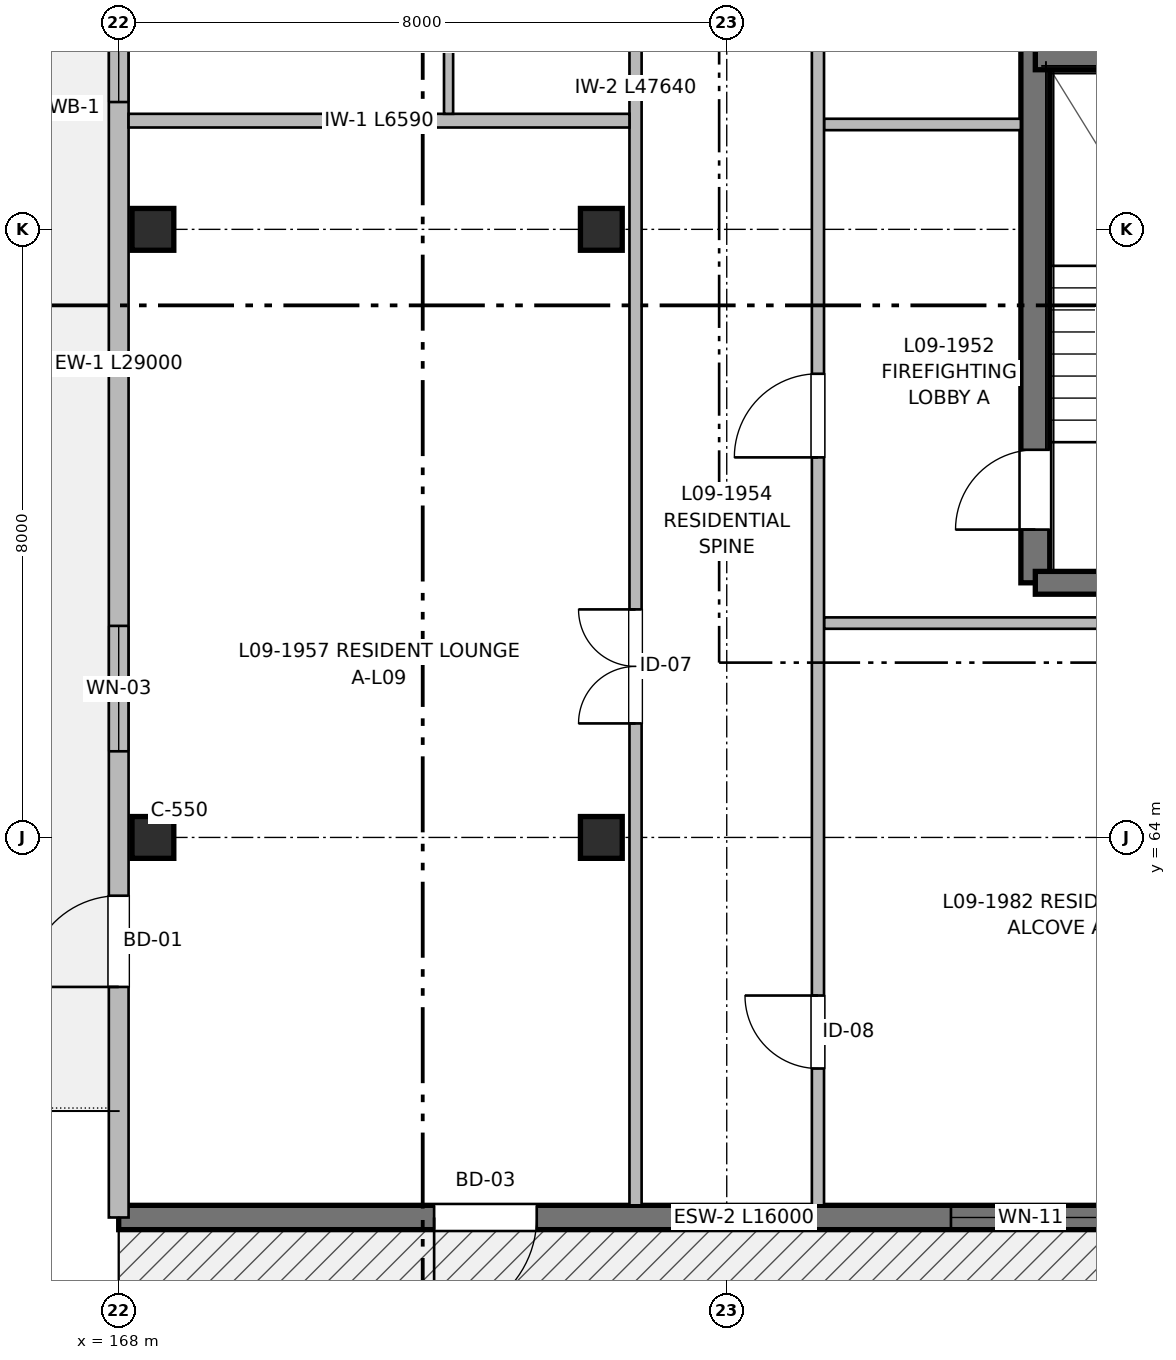
"""IFC4 building model, lengths in metres.
Left out: names, types, materials, properties, quantities, classifications, styles, units other than length and angle.
Written with IfcOpenShell. Run it as: python <this file> out.ifc"""

import sys

from ifc_helpers import new_model, si_unit, direction, frame, frame_2d, origin, origin_2d, place, context, subcontext, project, spatial, rectangle, extrude, element, fill, save


model = new_model("IFC4")
c1 = context("Model", 3, precision=1e-05, world=origin(), true_north=direction((0.0, 1.0)))
c2 = subcontext(c1, "Body", "Model", "MODEL_VIEW")
j1 = project(units=[si_unit("LENGTHUNIT", "METRE"), si_unit("PLANEANGLEUNIT", "RADIAN")], contexts=[c1])
p1 = place(None, origin())
s1 = spatial("IfcSite", under=j1, at=p1, CompositionType="ELEMENT")
p2 = place(p1, origin())
s2 = spatial("IfcBuilding", under=s1, at=p2, CompositionType="ELEMENT")
p3 = place(p2, frame((0.0, 0.0, 29.76)))
s3 = spatial("IfcBuildingStorey", under=s2, at=p3, CompositionType="ELEMENT", Elevation=29.76)
for number, where, z_axis, x_axis in (
    (1, (168.45, 64.0, 0.0), (0.0, 0.0, 1.0), (1.0, 0.0, 0.0)),
    (2, (168.45, 72.0, 0.0), (0.0, 0.0, 1.0), (1.0, 0.0, 0.0)),
    (3, (174.35, 64.0, 0.0), (0.0, 0.0, 1.0), (1.0, 0.0, 0.0)),
    (4, (174.35, 72.0, 0.0), (0.0, 0.0, 1.0), (1.0, 0.0, 0.0)),
):
    element("IfcColumn", number, at=place(p3, frame(where, z_axis=z_axis, x_axis=x_axis)), inside=s3, PredefinedType="COLUMN", context=c2, shape_type="SweptSolid", body=[
        extrude(rectangle(XDim=0.55, YDim=0.55, at=origin_2d()), origin(), (0.0, 0.0, 1.0), 3.2),
    ])
p4 = place(p3, frame((180.06, 67.35, 0.0), z_axis=(0.0, 0.0, 1.0), x_axis=(0.0, 1.0, 0.0)))
e5 = element("IfcWall", 5, at=p4, inside=s3, PredefinedType="SHEAR", context=c2, shape_type="SweptSolid", body=[
    extrude(rectangle(XDim=13.15, YDim=0.38, at=frame_2d((6.575, 0.0))), origin(), (0.0, 0.0, 1.0), 3.2),
])
p5 = place(p4, frame((0.7, 0.0, 0.0)))
e6 = element("IfcOpeningElement", 6, at=p5, cuts=e5, PredefinedType="OPENING", context=c2, shape_type="SweptSolid", body=[
    extrude(rectangle(XDim=1.05, YDim=2.15, at=frame_2d((0.525, 1.075))), frame((0.0, 0.2, 0.0), z_axis=(0.0, -1.0, 0.0), x_axis=(1.0, 0.0, 0.0)), (0.0, 0.0, 1.0), 0.4),
])
p6 = place(p3, frame((183.47, 67.35, 0.0), z_axis=(0.0, 0.0, 1.0), x_axis=(-1.0, 0.0, 0.0)))
e7 = element("IfcWall", 7, at=p6, inside=s3, PredefinedType="SHEAR", context=c2, shape_type="SweptSolid", body=[
    extrude(rectangle(XDim=3.41, YDim=0.3, at=frame_2d((1.705, 0.0))), origin(), (0.0, 0.0, 1.0), 3.2),
])
p7 = place(p3, frame((180.06, 74.24, 0.0), z_axis=(0.0, 0.0, 1.0), x_axis=(1.0, 0.0, 0.0)))
e8 = element("IfcWall", 8, at=p7, inside=s3, PredefinedType="SHEAR", context=c2, shape_type="SweptSolid", body=[
    extrude(rectangle(XDim=3.41, YDim=0.28, at=frame_2d((1.705, 0.0))), origin(), (0.0, 0.0, 1.0), 3.2),
])
p8 = place(p3, frame((184.0, 59.0, 0.0), z_axis=(0.0, 0.0, 1.0), x_axis=(-1.0, 0.0, 0.0)))
e9 = element("IfcWall", 9, at=p8, inside=s3, PredefinedType="SHEAR", context=c2, shape_type="SweptSolid", body=[
    extrude(rectangle(XDim=16.0, YDim=0.32, at=frame_2d((8.0, 0.0))), origin(), (0.0, 0.0, 1.0), 2.98),
])
p9 = place(p8, frame((10.5, 0.0, 0.0)))
e10 = element("IfcOpeningElement", 10, at=p9, cuts=e9, PredefinedType="OPENING", context=c2, shape_type="SweptSolid", body=[
    extrude(rectangle(XDim=1.35, YDim=2.2, at=frame_2d((0.675, 1.1))), frame((0.0, 0.17, 0.0), z_axis=(0.0, -1.0, 0.0), x_axis=(1.0, 0.0, 0.0)), (0.0, 0.0, 1.0), 0.34),
])
p10 = place(p8, frame((2.95, 0.0, 0.67)))
e11 = element("IfcOpeningElement", 11, at=p10, cuts=e9, PredefinedType="OPENING", context=c2, shape_type="SweptSolid", body=[
    extrude(rectangle(XDim=2.1, YDim=1.55, at=frame_2d((1.05, 0.775))), frame((0.0, 0.17, 0.0), z_axis=(0.0, -1.0, 0.0), x_axis=(1.0, 0.0, 0.0)), (0.0, 0.0, 1.0), 0.34),
])
p11 = place(p3, frame((168.0, 59.0, 0.0), z_axis=(0.0, 0.0, 1.0), x_axis=(0.0, 1.0, 0.0)))
e12 = element("IfcWall", 12, at=p11, inside=s3, PredefinedType="SOLIDWALL", context=c2, shape_type="SweptSolid", body=[
    extrude(rectangle(XDim=29.0, YDim=0.26, at=frame_2d((14.5, 0.0))), origin(), (0.0, 0.0, 1.0), 2.98),
])
p12 = place(p11, frame((3.033, 0.0, 0.0)))
e13 = element("IfcOpeningElement", 13, at=p12, cuts=e12, PredefinedType="OPENING", context=c2, shape_type="SweptSolid", body=[
    extrude(rectangle(XDim=1.2, YDim=2.2, at=frame_2d((0.6, 1.1))), frame((0.0, 0.14, 0.0), z_axis=(0.0, -1.0, 0.0), x_axis=(1.0, 0.0, 0.0)), (0.0, 0.0, 1.0), 0.28),
])
p13 = place(p11, frame((6.133, 0.0, 0.77)))
e14 = element("IfcOpeningElement", 14, at=p13, cuts=e12, PredefinedType="OPENING", context=c2, shape_type="SweptSolid", body=[
    extrude(rectangle(XDim=1.65, YDim=1.45, at=frame_2d((0.825, 0.725))), frame((0.0, 0.14, 0.0), z_axis=(0.0, -1.0, 0.0), x_axis=(1.0, 0.0, 0.0)), (0.0, 0.0, 1.0), 0.28),
])
p14 = place(p11, frame((14.675, 0.0, 0.72)))
e15 = element("IfcOpeningElement", 15, at=p14, cuts=e12, PredefinedType="OPENING", context=c2, shape_type="SweptSolid", body=[
    extrude(rectangle(XDim=2.25, YDim=1.5, at=frame_2d((1.125, 0.75))), frame((0.0, 0.14, 0.0), z_axis=(0.0, -1.0, 0.0), x_axis=(1.0, 0.0, 0.0)), (0.0, 0.0, 1.0), 0.28),
])
p15 = place(p11, frame((24.092, 0.0, 0.9)))
e16 = element("IfcOpeningElement", 16, at=p15, cuts=e12, PredefinedType="OPENING", context=c2, shape_type="SweptSolid", body=[
    extrude(rectangle(XDim=1.05, YDim=1.15, at=frame_2d((0.525, 0.575))), frame((0.0, 0.14, 0.0), z_axis=(0.0, -1.0, 0.0), x_axis=(1.0, 0.0, 0.0)), (0.0, 0.0, 1.0), 0.28),
])
p16 = place(p11, frame((21.43, 0.0, 0.82)))
e17 = element("IfcOpeningElement", 17, at=p16, cuts=e12, PredefinedType="OPENING", context=c2, shape_type="SweptSolid", body=[
    extrude(rectangle(XDim=1.5, YDim=1.4, at=frame_2d((0.75, 0.7))), frame((0.0, 0.14, 0.0), z_axis=(0.0, -1.0, 0.0), x_axis=(1.0, 0.0, 0.0)), (0.0, 0.0, 1.0), 0.28),
])
p17 = place(p3, frame((177.28, 66.82, 0.0), z_axis=(0.0, 0.0, 1.0), x_axis=(1.0, 0.0, 0.0)))
e18 = element("IfcWall", 18, at=p17, inside=s3, PredefinedType="PARTITIONING", context=c2, shape_type="SweptSolid", body=[
    extrude(rectangle(XDim=6.59, YDim=0.15, at=frame_2d((3.295, 0.0))), origin(), (0.0, 0.0, 1.0), 2.935),
])
p18 = place(p3, frame((177.28, 73.38, 0.0), z_axis=(0.0, 0.0, 1.0), x_axis=(1.0, 0.0, 0.0)))
e19 = element("IfcWall", 19, at=p18, inside=s3, PredefinedType="PARTITIONING", context=c2, shape_type="SweptSolid", body=[
    extrude(rectangle(XDim=2.59, YDim=0.15, at=frame_2d((1.295, 0.0))), origin(), (0.0, 0.0, 1.0), 2.935),
])
p19 = place(p3, frame((174.8, 59.16, 0.0), z_axis=(0.0, 0.0, 1.0), x_axis=(0.0, 1.0, 0.0)))
e20 = element("IfcWall", 20, at=p19, inside=s3, PredefinedType="PARTITIONING", context=c2, shape_type="SweptSolid", body=[
    extrude(rectangle(XDim=47.64, YDim=0.16, at=frame_2d((23.82, 0.0))), origin(), (0.0, 0.0, 1.0), 2.935),
])
p20 = place(p19, frame((6.34, 0.0, 0.0)))
e21 = element("IfcOpeningElement", 21, at=p20, cuts=e20, PredefinedType="OPENING", context=c2, shape_type="SweptSolid", body=[
    extrude(rectangle(XDim=1.5, YDim=2.2, at=frame_2d((0.75, 1.1))), frame((0.0, 0.09, 0.0), z_axis=(0.0, -1.0, 0.0), x_axis=(1.0, 0.0, 0.0)), (0.0, 0.0, 1.0), 0.18),
])
p21 = place(p19, frame((21.55, 0.0, 0.0)))
e22 = element("IfcOpeningElement", 22, at=p21, cuts=e20, PredefinedType="OPENING", context=c2, shape_type="SweptSolid", body=[
    extrude(rectangle(XDim=1.02, YDim=2.15, at=frame_2d((0.51, 1.075))), frame((0.0, 0.09, 0.0), z_axis=(0.0, -1.0, 0.0), x_axis=(1.0, 0.0, 0.0)), (0.0, 0.0, 1.0), 0.18),
])
p22 = place(p19, frame((33.59, 0.0, 0.0)))
e23 = element("IfcOpeningElement", 23, at=p22, cuts=e20, PredefinedType="OPENING", context=c2, shape_type="SweptSolid", body=[
    extrude(rectangle(XDim=0.98, YDim=2.15, at=frame_2d((0.49, 1.075))), frame((0.0, 0.09, 0.0), z_axis=(0.0, -1.0, 0.0), x_axis=(1.0, 0.0, 0.0)), (0.0, 0.0, 1.0), 0.18),
])
p23 = place(p19, frame((43.74, 0.0, 0.0)))
e24 = element("IfcOpeningElement", 24, at=p23, cuts=e20, PredefinedType="OPENING", context=c2, shape_type="SweptSolid", body=[
    extrude(rectangle(XDim=0.98, YDim=2.15, at=frame_2d((0.49, 1.075))), frame((0.0, 0.09, 0.0), z_axis=(0.0, -1.0, 0.0), x_axis=(1.0, 0.0, 0.0)), (0.0, 0.0, 1.0), 0.18),
])
p24 = place(p3, frame((177.2, 59.16, 0.0), z_axis=(0.0, 0.0, 1.0), x_axis=(0.0, 1.0, 0.0)))
e25 = element("IfcWall", 25, at=p24, inside=s3, PredefinedType="PARTITIONING", context=c2, shape_type="SweptSolid", body=[
    extrude(rectangle(XDim=47.64, YDim=0.16, at=frame_2d((23.82, 0.0))), origin(), (0.0, 0.0, 1.0), 2.935),
])
p25 = place(p24, frame((9.84, 0.0, 0.0)))
e26 = element("IfcOpeningElement", 26, at=p25, cuts=e25, PredefinedType="OPENING", context=c2, shape_type="SweptSolid", body=[
    extrude(rectangle(XDim=1.1, YDim=2.15, at=frame_2d((0.55, 1.075))), frame((0.0, 0.09, 0.0), z_axis=(0.0, -1.0, 0.0), x_axis=(1.0, 0.0, 0.0)), (0.0, 0.0, 1.0), 0.18),
])
p26 = place(p24, frame((16.24, 0.0, 0.0)))
e27 = element("IfcOpeningElement", 27, at=p26, cuts=e25, PredefinedType="OPENING", context=c2, shape_type="SweptSolid", body=[
    extrude(rectangle(XDim=1.6, YDim=2.15, at=frame_2d((0.8, 1.075))), frame((0.0, 0.09, 0.0), z_axis=(0.0, -1.0, 0.0), x_axis=(1.0, 0.0, 0.0)), (0.0, 0.0, 1.0), 0.18),
])
p27 = place(p24, frame((1.8, 0.0, 0.0)))
e28 = element("IfcOpeningElement", 28, at=p27, cuts=e25, PredefinedType="OPENING", context=c2, shape_type="SweptSolid", body=[
    extrude(rectangle(XDim=0.96, YDim=2.15, at=frame_2d((0.48, 1.075))), frame((0.0, 0.09, 0.0), z_axis=(0.0, -1.0, 0.0), x_axis=(1.0, 0.0, 0.0)), (0.0, 0.0, 1.0), 0.18),
])
p28 = place(p24, frame((29.57, 0.0, 0.0)))
e29 = element("IfcOpeningElement", 29, at=p28, cuts=e25, PredefinedType="OPENING", context=c2, shape_type="SweptSolid", body=[
    extrude(rectangle(XDim=0.98, YDim=2.15, at=frame_2d((0.49, 1.075))), frame((0.0, 0.09, 0.0), z_axis=(0.0, -1.0, 0.0), x_axis=(1.0, 0.0, 0.0)), (0.0, 0.0, 1.0), 0.18),
])
p29 = place(p24, frame((37.83, 0.0, 0.0)))
e30 = element("IfcOpeningElement", 30, at=p29, cuts=e25, PredefinedType="OPENING", context=c2, shape_type="SweptSolid", body=[
    extrude(rectangle(XDim=0.98, YDim=2.15, at=frame_2d((0.49, 1.075))), frame((0.0, 0.09, 0.0), z_axis=(0.0, -1.0, 0.0), x_axis=(1.0, 0.0, 0.0)), (0.0, 0.0, 1.0), 0.18),
])
p30 = place(p3, frame((168.13, 73.43, 0.0), z_axis=(0.0, 0.0, 1.0), x_axis=(1.0, 0.0, 0.0)))
e31 = element("IfcWall", 31, at=p30, inside=s3, PredefinedType="PARTITIONING", context=c2, shape_type="SweptSolid", body=[
    extrude(rectangle(XDim=6.59, YDim=0.18, at=frame_2d((3.295, 0.0))), origin(), (0.0, 0.0, 1.0), 2.935),
])
p31 = place(p3, frame((172.34, 73.52, 0.0), z_axis=(0.0, 0.0, 1.0), x_axis=(0.0, 1.0, 0.0)))
e32 = element("IfcWall", 32, at=p31, inside=s3, PredefinedType="PARTITIONING", context=c2, shape_type="SweptSolid", body=[
    extrude(rectangle(XDim=13.13, YDim=0.12, at=frame_2d((6.565, 0.0))), origin(), (0.0, 0.0, 1.0), 2.935),
])
p32 = place(p31, frame((2.295, 0.0, 0.0)))
e33 = element("IfcOpeningElement", 33, at=p32, cuts=e32, PredefinedType="OPENING", context=c2, shape_type="SweptSolid", body=[
    extrude(rectangle(XDim=0.94, YDim=2.1, at=frame_2d((0.47, 1.05))), frame((0.0, 0.07, 0.0), z_axis=(0.0, -1.0, 0.0), x_axis=(1.0, 0.0, 0.0)), (0.0, 0.0, 1.0), 0.14),
])
p33 = place(p31, frame((8.025, 0.0, 0.0)))
e34 = element("IfcOpeningElement", 34, at=p33, cuts=e32, PredefinedType="OPENING", context=c2, shape_type="SweptSolid", body=[
    extrude(rectangle(XDim=0.92, YDim=2.1, at=frame_2d((0.46, 1.05))), frame((0.0, 0.07, 0.0), z_axis=(0.0, -1.0, 0.0), x_axis=(1.0, 0.0, 0.0)), (0.0, 0.0, 1.0), 0.14),
])
p34 = place(p5, origin())
e35 = element("IfcDoor", 35, at=p34, inside=s3, OperationType="SINGLE_SWING_LEFT", PredefinedType="DOOR", context=c2, shape_type="SweptSolid", body=[
    extrude(rectangle(XDim=1.05, YDim=2.15, at=frame_2d((0.525, 1.075))), frame((0.0, 0.025, 0.0), z_axis=(0.0, -1.0, 0.0), x_axis=(1.0, 0.0, 0.0)), (0.0, 0.0, 1.0), 0.05),
])
fill(e6, e35)
p35 = place(p9, origin())
e36 = element("IfcDoor", 36, at=p35, inside=s3, OperationType="SINGLE_SWING_RIGHT", PredefinedType="DOOR", context=c2, shape_type="SweptSolid", body=[
    extrude(rectangle(XDim=1.35, YDim=2.2, at=frame_2d((0.675, 1.1))), frame((0.0, 0.025, 0.0), z_axis=(0.0, -1.0, 0.0), x_axis=(1.0, 0.0, 0.0)), (0.0, 0.0, 1.0), 0.05),
])
fill(e10, e36)
p36 = place(p10, origin())
e37 = element("IfcWindow", 37, at=p36, inside=s3, PartitioningType="SINGLE_PANEL", PredefinedType="WINDOW", context=c2, shape_type="SweptSolid", body=[
    extrude(rectangle(XDim=2.1, YDim=1.55, at=frame_2d((1.05, 0.775))), frame((0.0, 0.03, 0.0), z_axis=(0.0, -1.0, 0.0), x_axis=(1.0, 0.0, 0.0)), (0.0, 0.0, 1.0), 0.06),
])
fill(e11, e37)
p37 = place(p12, origin())
e38 = element("IfcDoor", 38, at=p37, inside=s3, OperationType="SINGLE_SWING_LEFT", PredefinedType="DOOR", context=c2, shape_type="SweptSolid", body=[
    extrude(rectangle(XDim=1.2, YDim=2.2, at=frame_2d((0.6, 1.1))), frame((0.0, 0.025, 0.0), z_axis=(0.0, -1.0, 0.0), x_axis=(1.0, 0.0, 0.0)), (0.0, 0.0, 1.0), 0.05),
])
fill(e13, e38)
p38 = place(p13, origin())
e39 = element("IfcWindow", 39, at=p38, inside=s3, PartitioningType="SINGLE_PANEL", PredefinedType="WINDOW", context=c2, shape_type="SweptSolid", body=[
    extrude(rectangle(XDim=1.65, YDim=1.45, at=frame_2d((0.825, 0.725))), frame((0.0, 0.03, 0.0), z_axis=(0.0, -1.0, 0.0), x_axis=(1.0, 0.0, 0.0)), (0.0, 0.0, 1.0), 0.06),
])
fill(e14, e39)
p39 = place(p14, origin())
e40 = element("IfcWindow", 40, at=p39, inside=s3, PartitioningType="SINGLE_PANEL", PredefinedType="WINDOW", context=c2, shape_type="SweptSolid", body=[
    extrude(rectangle(XDim=2.25, YDim=1.5, at=frame_2d((1.125, 0.75))), frame((0.0, 0.03, 0.0), z_axis=(0.0, -1.0, 0.0), x_axis=(1.0, 0.0, 0.0)), (0.0, 0.0, 1.0), 0.06),
])
fill(e15, e40)
p40 = place(p25, origin())
e41 = element("IfcDoor", 41, at=p40, inside=s3, OperationType="SINGLE_SWING_LEFT", PredefinedType="DOOR", context=c2, shape_type="SweptSolid", body=[
    extrude(rectangle(XDim=1.1, YDim=2.15, at=frame_2d((0.55, 1.075))), frame((0.0, 0.025, 0.0), z_axis=(0.0, -1.0, 0.0), x_axis=(1.0, 0.0, 0.0)), (0.0, 0.0, 1.0), 0.05),
])
fill(e26, e41)
p41 = place(p20, origin())
e42 = element("IfcDoor", 42, at=p41, inside=s3, OperationType="DOUBLE_DOOR_SINGLE_SWING", PredefinedType="DOOR", context=c2, shape_type="SweptSolid", body=[
    extrude(rectangle(XDim=1.5, YDim=2.2, at=frame_2d((0.75, 1.1))), frame((0.0, 0.025, 0.0), z_axis=(0.0, -1.0, 0.0), x_axis=(1.0, 0.0, 0.0)), (0.0, 0.0, 1.0), 0.05),
])
fill(e21, e42)
p42 = place(p27, origin())
e43 = element("IfcDoor", 43, at=p42, inside=s3, OperationType="SINGLE_SWING_RIGHT", PredefinedType="DOOR", context=c2, shape_type="SweptSolid", body=[
    extrude(rectangle(XDim=0.96, YDim=2.15, at=frame_2d((0.48, 1.075))), frame((0.0, 0.025, 0.0), z_axis=(0.0, -1.0, 0.0), x_axis=(1.0, 0.0, 0.0)), (0.0, 0.0, 1.0), 0.05),
])
fill(e28, e43)
save(model, sys.argv[1])
